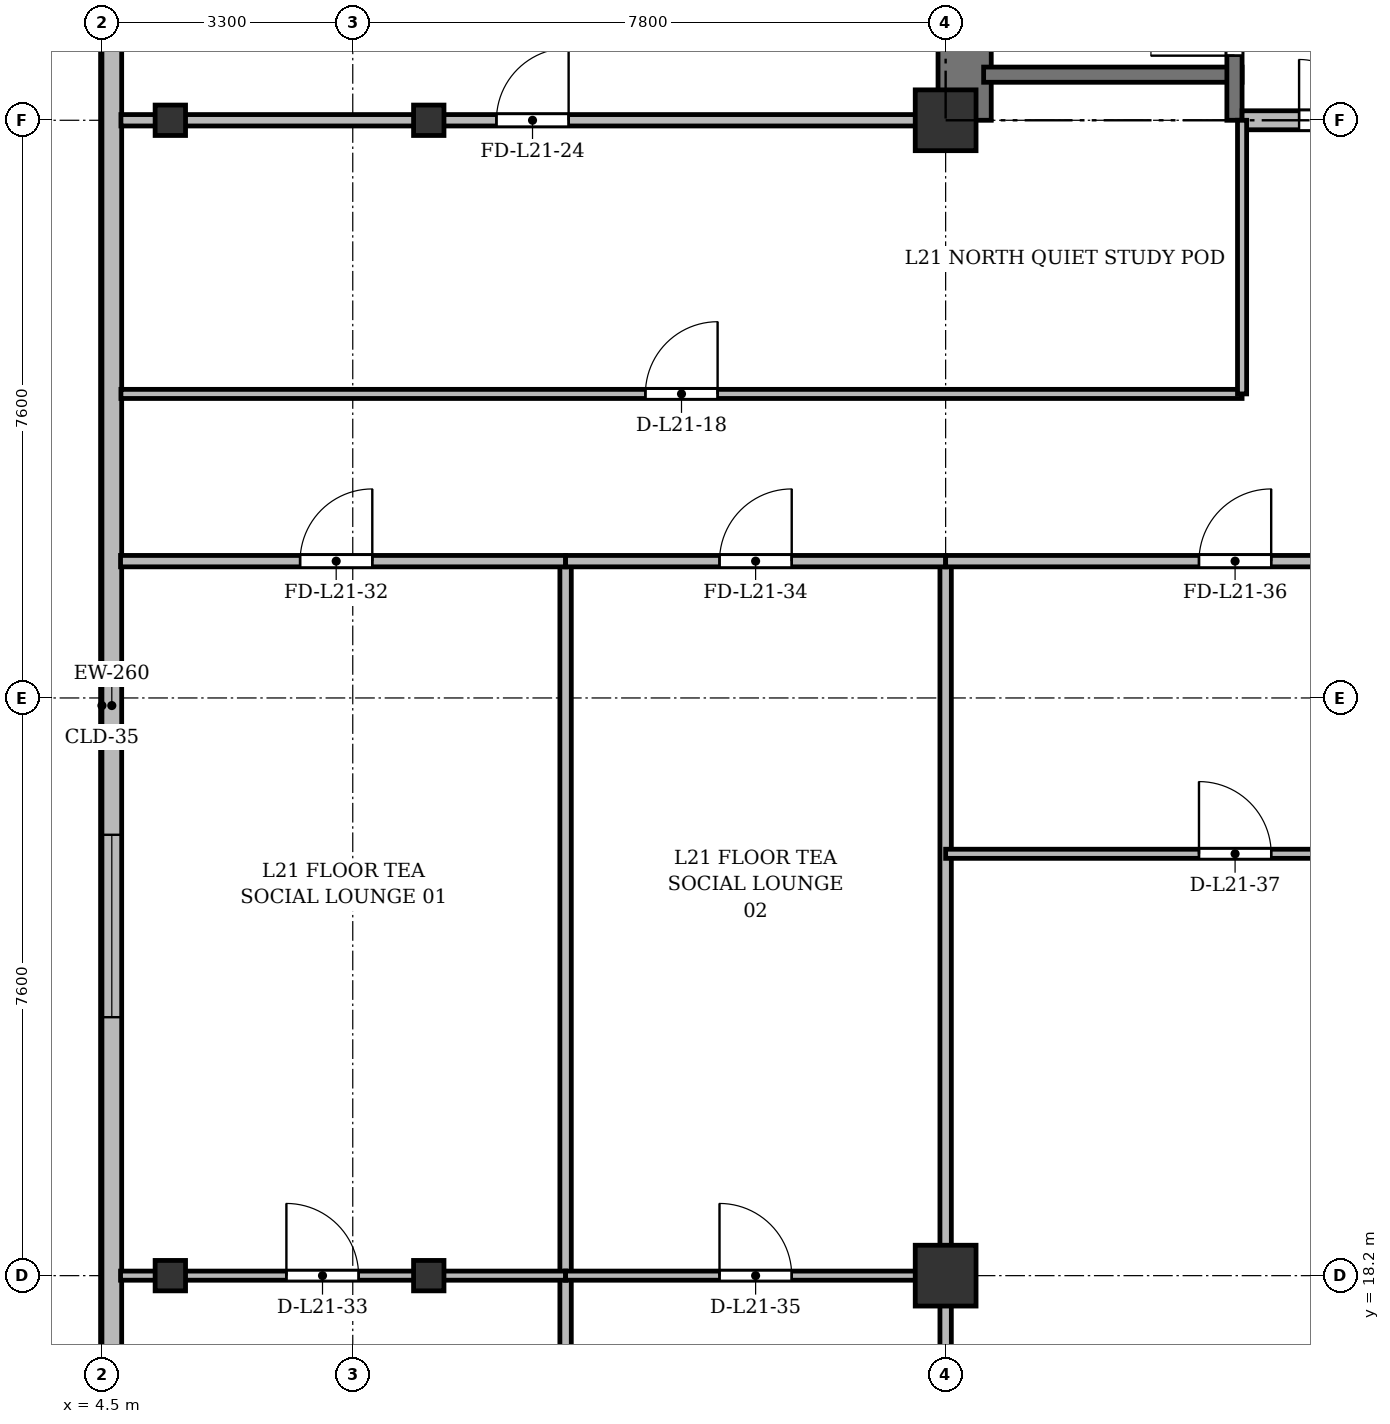
"""IFC4 building model, lengths in metres.
Left out: names, types, materials, properties, quantities, classifications, styles, units other than length and angle.
Written with IfcOpenShell. Run it as: python <this file> out.ifc"""

import sys

from ifc_helpers import new_model, si_unit, direction, frame, frame_2d, origin, origin_2d, place, context, subcontext, project, spatial, rectangle, i_section, extrude, source, transform, mapped, element, fill, save


model = new_model("IFC4")
c1 = context("Model", 3, precision=1e-05, world=origin(), true_north=direction((0.0, 1.0)))
c2 = subcontext(c1, "Body", "Model", "MODEL_VIEW")
j1 = project(units=[si_unit("LENGTHUNIT", "METRE"), si_unit("PLANEANGLEUNIT", "RADIAN")], contexts=[c1])
p1 = place(None, origin())
s1 = spatial("IfcSite", under=j1, at=p1, CompositionType="ELEMENT")
p2 = place(p1, origin())
s2 = spatial("IfcBuilding", under=s1, at=p2, CompositionType="ELEMENT")
p3 = place(p2, frame((0.0, 0.0, 85.3)))
s3 = spatial("IfcBuildingStorey", under=s2, at=p3, CompositionType="ELEMENT", Elevation=85.3)
m1 = source(origin(), c2, "Body", "SweptSolid", [
    extrude(i_section(OverallWidth=0.4, OverallDepth=0.4, WebThickness=0.022, FlangeThickness=0.035, at=origin_2d()), origin(), (0.0, 0.0, 1.0), 3.6),
])
for number, where, z_axis, x_axis in (
    (1, (5.4, 18.2, 0.0), (0.0, 0.0, 1.0), (1.0, 0.0, 0.0)),
    (2, (5.4, 33.4, 0.0), (0.0, 0.0, 1.0), (1.0, 0.0, 0.0)),
    (3, (8.8, 18.2, 0.0), (0.0, 0.0, 1.0), (1.0, 0.0, 0.0)),
    (4, (8.8, 33.4, 0.0), (0.0, 0.0, 1.0), (1.0, 0.0, 0.0)),
):
    element("IfcColumn", number, at=place(p3, frame(where, z_axis=z_axis, x_axis=x_axis)), inside=s3, PredefinedType="COLUMN", context=c2, shape_type="MappedRepresentation", body=[
        mapped(m1, transform((0.0, 0.0, 0.0), x_axis=(1.0, 0.0, 0.0), y_axis=(0.0, 1.0, 0.0), z_axis=(0.0, 0.0, 1.0), scale=1.0)),
    ])
m2 = source(origin(), c2, "Body", "SweptSolid", [
    extrude(rectangle(XDim=0.8, YDim=0.8, at=origin_2d()), origin(), (0.0, 0.0, 1.0), 3.6),
])
for number, where, z_axis, x_axis in (
    (5, (15.6, 18.2, 0.0), (0.0, 0.0, 1.0), (1.0, 0.0, 0.0)),
    (6, (15.6, 33.4, 0.0), (0.0, 0.0, 1.0), (1.0, 0.0, 0.0)),
):
    element("IfcColumn", number, at=place(p3, frame(where, z_axis=z_axis, x_axis=x_axis)), inside=s3, PredefinedType="COLUMN", context=c2, shape_type="MappedRepresentation", body=[
        mapped(m2, transform((0.0, 0.0, 0.0), x_axis=(1.0, 0.0, 0.0), y_axis=(0.0, 1.0, 0.0), z_axis=(0.0, 0.0, 1.0), scale=1.0)),
    ])
p4 = place(p3, frame((4.63, 5.9, 0.0), z_axis=(0.0, 0.0, 1.0), x_axis=(0.0, 1.0, 0.0)))
e7 = element("IfcWall", 7, at=p4, inside=s3, PredefinedType="SOLIDWALL", context=c2, shape_type="SweptSolid", body=[
    extrude(rectangle(XDim=39.6, YDim=0.26, at=frame_2d((19.8, 0.0))), origin(), (0.0, 0.0, 1.0), 3.34),
])
p5 = place(p4, frame((1.45, 0.0, 0.92)))
e8 = element("IfcOpeningElement", 8, at=p5, cuts=e7, PredefinedType="OPENING", context=c2, shape_type="SweptSolid", body=[
    extrude(rectangle(XDim=1.2, YDim=1.65, at=frame_2d((0.6, 0.825))), frame((0.0, 0.14, 0.0), z_axis=(0.0, -1.0, 0.0), x_axis=(1.0, 0.0, 0.0)), (0.0, 0.0, 1.0), 0.28),
])
p6 = place(p4, frame((4.3, 0.0, 0.92)))
e9 = element("IfcOpeningElement", 9, at=p6, cuts=e7, PredefinedType="OPENING", context=c2, shape_type="SweptSolid", body=[
    extrude(rectangle(XDim=2.4, YDim=2.1, at=frame_2d((1.2, 1.05))), frame((0.0, 0.14, 0.0), z_axis=(0.0, -1.0, 0.0), x_axis=(1.0, 0.0, 0.0)), (0.0, 0.0, 1.0), 0.28),
])
p7 = place(p4, frame((8.5, 0.0, 0.92)))
e10 = element("IfcOpeningElement", 10, at=p7, cuts=e7, PredefinedType="OPENING", context=c2, shape_type="SweptSolid", body=[
    extrude(rectangle(XDim=2.4, YDim=2.1, at=frame_2d((1.2, 1.05))), frame((0.0, 0.14, 0.0), z_axis=(0.0, -1.0, 0.0), x_axis=(1.0, 0.0, 0.0)), (0.0, 0.0, 1.0), 0.28),
])
p8 = place(p4, frame((15.7, 0.0, 0.92)))
e11 = element("IfcOpeningElement", 11, at=p8, cuts=e7, PredefinedType="OPENING", context=c2, shape_type="SweptSolid", body=[
    extrude(rectangle(XDim=2.4, YDim=2.1, at=frame_2d((1.2, 1.05))), frame((0.0, 0.14, 0.0), z_axis=(0.0, -1.0, 0.0), x_axis=(1.0, 0.0, 0.0)), (0.0, 0.0, 1.0), 0.28),
])
p9 = place(p4, frame((29.7, 0.0, 0.92)))
e12 = element("IfcOpeningElement", 12, at=p9, cuts=e7, PredefinedType="OPENING", context=c2, shape_type="SweptSolid", body=[
    extrude(rectangle(XDim=2.4, YDim=2.1, at=frame_2d((1.2, 1.05))), frame((0.0, 0.14, 0.0), z_axis=(0.0, -1.0, 0.0), x_axis=(1.0, 0.0, 0.0)), (0.0, 0.0, 1.0), 0.28),
])
p10 = place(p4, frame((37.25, 0.0, 0.92)))
e13 = element("IfcOpeningElement", 13, at=p10, cuts=e7, PredefinedType="OPENING", context=c2, shape_type="SweptSolid", body=[
    extrude(rectangle(XDim=1.2, YDim=1.65, at=frame_2d((0.6, 0.825))), frame((0.0, 0.14, 0.0), z_axis=(0.0, -1.0, 0.0), x_axis=(1.0, 0.0, 0.0)), (0.0, 0.0, 1.0), 0.28),
])
p11 = place(p3, frame((15.85, 33.4, 0.0), z_axis=(0.0, 0.0, 1.0), x_axis=(0.0, 1.0, 0.0)))
e14 = element("IfcWall", 14, at=p11, inside=s3, PredefinedType="SHEAR", context=c2, shape_type="SweptSolid", body=[
    extrude(rectangle(XDim=11.7, YDim=0.7, at=frame_2d((5.85, 0.0))), origin(), (0.0, 0.0, 1.0), 3.34),
])
p12 = place(p3, frame((16.1, 34.0, 0.0), z_axis=(0.0, 0.0, 1.0), x_axis=(1.0, 0.0, 0.0)))
e15 = element("IfcWall", 15, at=p12, inside=s3, PredefinedType="SHEAR", context=c2, shape_type="SweptSolid", body=[
    extrude(rectangle(XDim=3.4, YDim=0.2, at=frame_2d((1.7, 0.0))), origin(), (0.0, 0.0, 1.0), 3.34),
])
p13 = place(p3, frame((19.4, 33.4, 0.0), z_axis=(0.0, 0.0, 1.0), x_axis=(0.0, 1.0, 0.0)))
e16 = element("IfcWall", 16, at=p13, inside=s3, PredefinedType="SHEAR", context=c2, shape_type="SweptSolid", body=[
    extrude(rectangle(XDim=11.1, YDim=0.2, at=frame_2d((5.55, 0.0))), origin(), (0.0, 0.0, 1.0), 3.34),
])
p14 = place(p13, frame((0.85, 0.0, 0.0)))
e17 = element("IfcOpeningElement", 17, at=p14, cuts=e16, PredefinedType="OPENING", context=c2, shape_type="SweptSolid", body=[
    extrude(rectangle(XDim=1.1, YDim=2.15, at=frame_2d((0.55, 1.075))), frame((0.0, 0.11, 0.0), z_axis=(0.0, -1.0, 0.0), x_axis=(1.0, 0.0, 0.0)), (0.0, 0.0, 1.0), 0.22),
])
p15 = place(p3, frame((19.5, 33.4, 0.0), z_axis=(0.0, 0.0, 1.0), x_axis=(1.0, 0.0, 0.0)))
e18 = element("IfcWall", 18, at=p15, inside=s3, PredefinedType="PARTITIONING", context=c2, shape_type="SweptSolid", body=[
    extrude(rectangle(XDim=6.8, YDim=0.25, at=frame_2d((3.4, 0.0))), origin(), (0.0, 0.0, 1.0), 2.752),
])
p16 = place(p15, frame((0.75, 0.0, 0.0)))
e19 = element("IfcOpeningElement", 19, at=p16, cuts=e18, PredefinedType="OPENING", context=c2, shape_type="SweptSolid", body=[
    extrude(rectangle(XDim=1.6, YDim=2.2, at=frame_2d((0.8, 1.1))), frame((0.0, 0.135, 0.0), z_axis=(0.0, -1.0, 0.0), x_axis=(1.0, 0.0, 0.0)), (0.0, 0.0, 1.0), 0.27),
])
p17 = place(p3, frame((4.75, 29.8, 0.0), z_axis=(0.0, 0.0, 1.0), x_axis=(1.0, 0.0, 0.0)))
e20 = element("IfcWall", 20, at=p17, inside=s3, PredefinedType="PARTITIONING", context=c2, shape_type="SweptSolid", body=[
    extrude(rectangle(XDim=14.75, YDim=0.12, at=frame_2d((7.375, 0.0))), origin(), (0.0, 0.0, 1.0), 2.84),
])
p18 = place(p17, frame((6.9, 0.0, 0.0)))
e21 = element("IfcOpeningElement", 21, at=p18, cuts=e20, PredefinedType="OPENING", context=c2, shape_type="SweptSolid", body=[
    extrude(rectangle(XDim=0.95, YDim=2.15, at=frame_2d((0.475, 1.075))), frame((0.0, 0.07, 0.0), z_axis=(0.0, -1.0, 0.0), x_axis=(1.0, 0.0, 0.0)), (0.0, 0.0, 1.0), 0.14),
])
p19 = place(p3, frame((19.5, 29.8, 0.0), z_axis=(0.0, 0.0, 1.0), x_axis=(0.0, 1.0, 0.0)))
e22 = element("IfcWall", 22, at=p19, inside=s3, PredefinedType="PARTITIONING", context=c2, shape_type="SweptSolid", body=[
    extrude(rectangle(XDim=3.6, YDim=0.12, at=frame_2d((1.8, 0.0))), origin(), (0.0, 0.0, 1.0), 2.752),
])
p20 = place(p3, frame((4.75, 33.4, 0.0), z_axis=(0.0, 0.0, 1.0), x_axis=(1.0, 0.0, 0.0)))
e23 = element("IfcWall", 23, at=p20, inside=s3, PredefinedType="PARTITIONING", context=c2, shape_type="SweptSolid", body=[
    extrude(rectangle(XDim=10.85, YDim=0.15, at=frame_2d((5.425, 0.0))), origin(), (0.0, 0.0, 1.0), 2.752),
])
p21 = place(p20, frame((4.94, 0.0, 0.0)))
e24 = element("IfcOpeningElement", 24, at=p21, cuts=e23, PredefinedType="OPENING", context=c2, shape_type="SweptSolid", body=[
    extrude(rectangle(XDim=0.95, YDim=2.15, at=frame_2d((0.475, 1.075))), frame((0.0, 0.085, 0.0), z_axis=(0.0, -1.0, 0.0), x_axis=(1.0, 0.0, 0.0)), (0.0, 0.0, 1.0), 0.17),
])
p22 = place(p3, frame((10.6, 3.145, 0.0), z_axis=(0.0, 0.0, 1.0), x_axis=(0.0, 1.0, 0.0)))
e25 = element("IfcWall", 25, at=p22, inside=s3, PredefinedType="PARTITIONING", context=c2, shape_type="SweptSolid", body=[
    extrude(rectangle(XDim=24.455, YDim=0.15, at=frame_2d((12.228, 0.0))), origin(), (0.0, 0.0, 1.0), 2.752),
])
p23 = place(p3, frame((15.6, 3.145, 0.0), z_axis=(0.0, 0.0, 1.0), x_axis=(0.0, 1.0, 0.0)))
e26 = element("IfcWall", 26, at=p23, inside=s3, PredefinedType="PARTITIONING", context=c2, shape_type="SweptSolid", body=[
    extrude(rectangle(XDim=24.455, YDim=0.15, at=frame_2d((12.228, 0.0))), origin(), (0.0, 0.0, 1.0), 2.84),
])
p24 = place(p3, frame((4.745, 27.6, 0.0), z_axis=(0.0, 0.0, 1.0), x_axis=(1.0, 0.0, 0.0)))
e27 = element("IfcWall", 27, at=p24, inside=s3, PredefinedType="PARTITIONING", context=c2, shape_type="SweptSolid", body=[
    extrude(rectangle(XDim=5.855, YDim=0.15, at=frame_2d((2.927, 0.0))), origin(), (0.0, 0.0, 1.0), 2.84),
])
p25 = place(p24, frame((2.362, 0.0, 0.0)))
e28 = element("IfcOpeningElement", 28, at=p25, cuts=e27, PredefinedType="OPENING", context=c2, shape_type="SweptSolid", body=[
    extrude(rectangle(XDim=0.95, YDim=2.15, at=frame_2d((0.475, 1.075))), frame((0.0, 0.085, 0.0), z_axis=(0.0, -1.0, 0.0), x_axis=(1.0, 0.0, 0.0)), (0.0, 0.0, 1.0), 0.17),
])
p26 = place(p3, frame((4.745, 18.2, 0.0), z_axis=(0.0, 0.0, 1.0), x_axis=(1.0, 0.0, 0.0)))
e29 = element("IfcWall", 29, at=p26, inside=s3, PredefinedType="PARTITIONING", context=c2, shape_type="SweptSolid", body=[
    extrude(rectangle(XDim=5.855, YDim=0.12, at=frame_2d((2.927, 0.0))), origin(), (0.0, 0.0, 1.0), 2.752),
])
p27 = place(p26, frame((2.182, 0.0, 0.0)))
e30 = element("IfcOpeningElement", 30, at=p27, cuts=e29, PredefinedType="OPENING", context=c2, shape_type="SweptSolid", body=[
    extrude(rectangle(XDim=0.95, YDim=2.15, at=frame_2d((0.475, 1.075))), frame((0.0, 0.07, 0.0), z_axis=(0.0, -1.0, 0.0), x_axis=(1.0, 0.0, 0.0)), (0.0, 0.0, 1.0), 0.14),
])
p28 = place(p3, frame((10.6, 27.6, 0.0), z_axis=(0.0, 0.0, 1.0), x_axis=(1.0, 0.0, 0.0)))
e31 = element("IfcWall", 31, at=p28, inside=s3, PredefinedType="PARTITIONING", context=c2, shape_type="SweptSolid", body=[
    extrude(rectangle(XDim=5.0, YDim=0.15, at=frame_2d((2.5, 0.0))), origin(), (0.0, 0.0, 1.0), 2.84),
])
p29 = place(p28, frame((2.025, 0.0, 0.0)))
e32 = element("IfcOpeningElement", 32, at=p29, cuts=e31, PredefinedType="OPENING", context=c2, shape_type="SweptSolid", body=[
    extrude(rectangle(XDim=0.95, YDim=2.15, at=frame_2d((0.475, 1.075))), frame((0.0, 0.085, 0.0), z_axis=(0.0, -1.0, 0.0), x_axis=(1.0, 0.0, 0.0)), (0.0, 0.0, 1.0), 0.17),
])
p30 = place(p3, frame((10.6, 18.2, 0.0), z_axis=(0.0, 0.0, 1.0), x_axis=(1.0, 0.0, 0.0)))
e33 = element("IfcWall", 33, at=p30, inside=s3, PredefinedType="PARTITIONING", context=c2, shape_type="SweptSolid", body=[
    extrude(rectangle(XDim=5.0, YDim=0.12, at=frame_2d((2.5, 0.0))), origin(), (0.0, 0.0, 1.0), 2.752),
])
p31 = place(p30, frame((2.025, 0.0, 0.0)))
e34 = element("IfcOpeningElement", 34, at=p31, cuts=e33, PredefinedType="OPENING", context=c2, shape_type="SweptSolid", body=[
    extrude(rectangle(XDim=0.95, YDim=2.15, at=frame_2d((0.475, 1.075))), frame((0.0, 0.07, 0.0), z_axis=(0.0, -1.0, 0.0), x_axis=(1.0, 0.0, 0.0)), (0.0, 0.0, 1.0), 0.14),
])
p32 = place(p3, frame((15.6, 27.6, 0.0), z_axis=(0.0, 0.0, 1.0), x_axis=(1.0, 0.0, 0.0)))
e35 = element("IfcWall", 35, at=p32, inside=s3, PredefinedType="PARTITIONING", context=c2, shape_type="SweptSolid", body=[
    extrude(rectangle(XDim=7.8, YDim=0.15, at=frame_2d((3.9, 0.0))), origin(), (0.0, 0.0, 1.0), 2.84),
])
p33 = place(p32, frame((3.333, 0.0, 0.0)))
e36 = element("IfcOpeningElement", 36, at=p33, cuts=e35, PredefinedType="OPENING", context=c2, shape_type="SweptSolid", body=[
    extrude(rectangle(XDim=0.95, YDim=2.15, at=frame_2d((0.475, 1.075))), frame((0.0, 0.085, 0.0), z_axis=(0.0, -1.0, 0.0), x_axis=(1.0, 0.0, 0.0)), (0.0, 0.0, 1.0), 0.17),
])
p34 = place(p3, frame((15.6, 23.75, 0.0), z_axis=(0.0, 0.0, 1.0), x_axis=(1.0, 0.0, 0.0)))
e37 = element("IfcWall", 37, at=p34, inside=s3, PredefinedType="PARTITIONING", context=c2, shape_type="SweptSolid", body=[
    extrude(rectangle(XDim=7.8, YDim=0.12, at=frame_2d((3.9, 0.0))), origin(), (0.0, 0.0, 1.0), 2.84),
])
p35 = place(p34, frame((3.333, 0.0, 0.0)))
e38 = element("IfcOpeningElement", 38, at=p35, cuts=e37, PredefinedType="OPENING", context=c2, shape_type="SweptSolid", body=[
    extrude(rectangle(XDim=0.95, YDim=2.15, at=frame_2d((0.475, 1.075))), frame((0.0, 0.07, 0.0), z_axis=(0.0, -1.0, 0.0), x_axis=(1.0, 0.0, 0.0)), (0.0, 0.0, 1.0), 0.14),
])
m3 = source(origin(), c2, "Body", "SweptSolid", [
    extrude(rectangle(XDim=2.4, YDim=2.1, at=frame_2d((1.2, 1.05))), frame((0.0, 0.03, 0.0), z_axis=(0.0, -1.0, 0.0), x_axis=(1.0, 0.0, 0.0)), (0.0, 0.0, 1.0), 0.06),
])
p36 = place(p8, origin())
e39 = element("IfcWindow", 39, at=p36, inside=s3, PartitioningType="SINGLE_PANEL", PredefinedType="WINDOW", context=c2, shape_type="MappedRepresentation", body=[
    mapped(m3, transform((0.0, 0.0, 0.0), x_axis=(1.0, 0.0, 0.0), y_axis=(0.0, 1.0, 0.0), z_axis=(0.0, 0.0, 1.0), scale=1.0)),
])
fill(e11, e39)
m4 = source(origin(), c2, "Body", "SweptSolid", [
    extrude(rectangle(XDim=1.1, YDim=2.15, at=frame_2d((0.55, 1.075))), frame((0.0, 0.025, 0.0), z_axis=(0.0, -1.0, 0.0), x_axis=(1.0, 0.0, 0.0)), (0.0, 0.0, 1.0), 0.05),
])
p37 = place(p14, origin())
e40 = element("IfcDoor", 40, at=p37, inside=s3, OperationType="SINGLE_SWING_LEFT", PredefinedType="DOOR", context=c2, shape_type="MappedRepresentation", body=[
    mapped(m4, transform((0.0, 0.0, 0.0), x_axis=(1.0, 0.0, 0.0), y_axis=(0.0, 1.0, 0.0), z_axis=(0.0, 0.0, 1.0), scale=1.0)),
])
fill(e17, e40)
m5 = source(origin(), c2, "Body", "SweptSolid", [
    extrude(rectangle(XDim=1.6, YDim=2.2, at=frame_2d((0.8, 1.1))), frame((0.0, 0.025, 0.0), z_axis=(0.0, -1.0, 0.0), x_axis=(1.0, 0.0, 0.0)), (0.0, 0.0, 1.0), 0.05),
])
p38 = place(p16, origin())
e41 = element("IfcDoor", 41, at=p38, inside=s3, OperationType="DOUBLE_DOOR_SINGLE_SWING", PredefinedType="DOOR", context=c2, shape_type="MappedRepresentation", body=[
    mapped(m5, transform((0.0, 0.0, 0.0), x_axis=(1.0, 0.0, 0.0), y_axis=(0.0, 1.0, 0.0), z_axis=(0.0, 0.0, 1.0), scale=1.0)),
])
fill(e19, e41)
m6 = source(origin(), c2, "Body", "SweptSolid", [
    extrude(rectangle(XDim=0.95, YDim=2.15, at=frame_2d((0.475, 1.075))), frame((0.0, 0.025, 0.0), z_axis=(0.0, -1.0, 0.0), x_axis=(1.0, 0.0, 0.0)), (0.0, 0.0, 1.0), 0.05),
])
p39 = place(p18, origin())
e42 = element("IfcDoor", 42, at=p39, inside=s3, OperationType="SINGLE_SWING_RIGHT", PredefinedType="DOOR", context=c2, shape_type="MappedRepresentation", body=[
    mapped(m6, transform((0.0, 0.0, 0.0), x_axis=(1.0, 0.0, 0.0), y_axis=(0.0, 1.0, 0.0), z_axis=(0.0, 0.0, 1.0), scale=1.0)),
])
fill(e21, e42)
p40 = place(p21, origin())
e43 = element("IfcDoor", 43, at=p40, inside=s3, OperationType="SINGLE_SWING_RIGHT", PredefinedType="DOOR", context=c2, shape_type="MappedRepresentation", body=[
    mapped(m6, transform((0.0, 0.0, 0.0), x_axis=(1.0, 0.0, 0.0), y_axis=(0.0, 1.0, 0.0), z_axis=(0.0, 0.0, 1.0), scale=1.0)),
])
fill(e24, e43)
p41 = place(p25, origin())
e44 = element("IfcDoor", 44, at=p41, inside=s3, OperationType="SINGLE_SWING_RIGHT", PredefinedType="DOOR", context=c2, shape_type="MappedRepresentation", body=[
    mapped(m6, transform((0.0, 0.0, 0.0), x_axis=(1.0, 0.0, 0.0), y_axis=(0.0, 1.0, 0.0), z_axis=(0.0, 0.0, 1.0), scale=1.0)),
])
fill(e28, e44)
p42 = place(p27, origin())
e45 = element("IfcDoor", 45, at=p42, inside=s3, OperationType="SINGLE_SWING_LEFT", PredefinedType="DOOR", context=c2, shape_type="MappedRepresentation", body=[
    mapped(m6, transform((0.0, 0.0, 0.0), x_axis=(1.0, 0.0, 0.0), y_axis=(0.0, 1.0, 0.0), z_axis=(0.0, 0.0, 1.0), scale=1.0)),
])
fill(e30, e45)
p43 = place(p29, origin())
e46 = element("IfcDoor", 46, at=p43, inside=s3, OperationType="SINGLE_SWING_RIGHT", PredefinedType="DOOR", context=c2, shape_type="MappedRepresentation", body=[
    mapped(m6, transform((0.0, 0.0, 0.0), x_axis=(1.0, 0.0, 0.0), y_axis=(0.0, 1.0, 0.0), z_axis=(0.0, 0.0, 1.0), scale=1.0)),
])
fill(e32, e46)
p44 = place(p31, origin())
e47 = element("IfcDoor", 47, at=p44, inside=s3, OperationType="SINGLE_SWING_LEFT", PredefinedType="DOOR", context=c2, shape_type="MappedRepresentation", body=[
    mapped(m6, transform((0.0, 0.0, 0.0), x_axis=(1.0, 0.0, 0.0), y_axis=(0.0, 1.0, 0.0), z_axis=(0.0, 0.0, 1.0), scale=1.0)),
])
fill(e34, e47)
p45 = place(p33, origin())
e48 = element("IfcDoor", 48, at=p45, inside=s3, OperationType="SINGLE_SWING_RIGHT", PredefinedType="DOOR", context=c2, shape_type="MappedRepresentation", body=[
    mapped(m6, transform((0.0, 0.0, 0.0), x_axis=(1.0, 0.0, 0.0), y_axis=(0.0, 1.0, 0.0), z_axis=(0.0, 0.0, 1.0), scale=1.0)),
])
fill(e36, e48)
p46 = place(p35, origin())
e49 = element("IfcDoor", 49, at=p46, inside=s3, OperationType="SINGLE_SWING_LEFT", PredefinedType="DOOR", context=c2, shape_type="MappedRepresentation", body=[
    mapped(m6, transform((0.0, 0.0, 0.0), x_axis=(1.0, 0.0, 0.0), y_axis=(0.0, 1.0, 0.0), z_axis=(0.0, 0.0, 1.0), scale=1.0)),
])
fill(e38, e49)
save(model, sys.argv[1])
